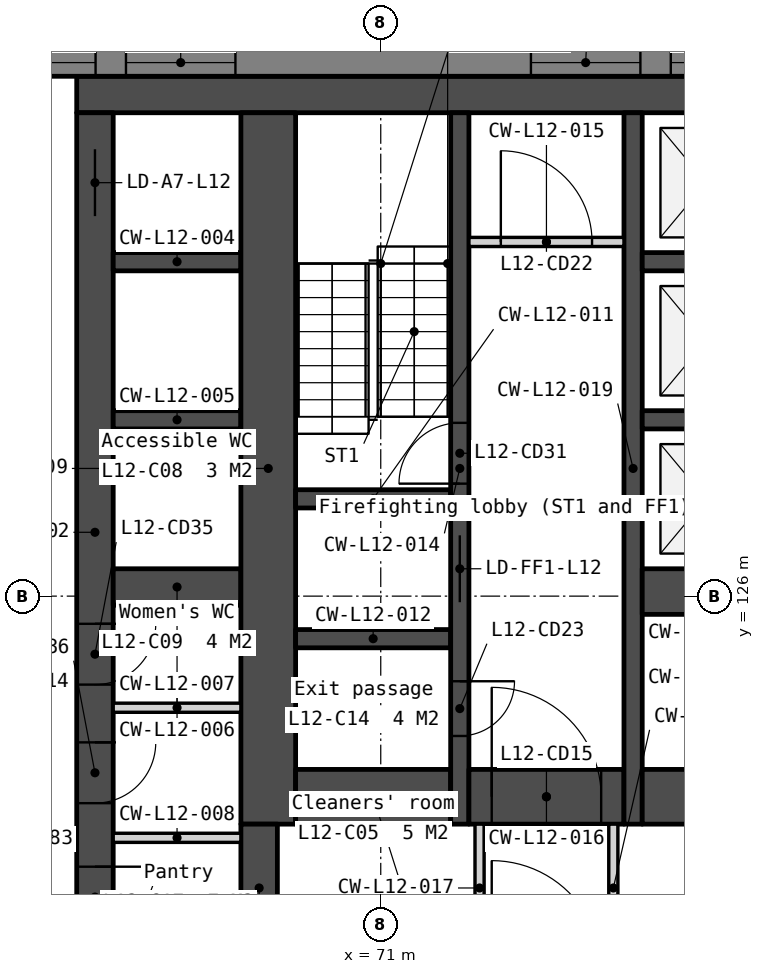
"""IFC4 building model, lengths in metres.
Left out: names, types, materials, properties, quantities, classifications, styles, units other than length and angle.
Written with IfcOpenShell. Run it as: python <this file> out.ifc"""

import sys

from ifc_helpers import new_model, si_unit, direction, frame, frame_2d, origin, place, context, subcontext, project, spatial, polyline, rectangle, outline, extrude, element, fill, save


model = new_model("IFC4")
c1 = context("Model", 3, precision=1e-05, world=origin(), true_north=direction((0.0, 1.0)))
c2 = subcontext(c1, "Body", "Model", "MODEL_VIEW")
j1 = project(units=[si_unit("LENGTHUNIT", "METRE"), si_unit("PLANEANGLEUNIT", "RADIAN")], contexts=[c1])
p1 = place(None, origin())
s1 = spatial("IfcSite", under=j1, at=p1, CompositionType="ELEMENT")
p2 = place(p1, origin())
s2 = spatial("IfcBuilding", under=s1, at=p2, CompositionType="ELEMENT")
p3 = place(p2, frame((0.0, 0.0, 56.0)))
s3 = spatial("IfcBuildingStorey", under=s2, at=p3, CompositionType="ELEMENT", Elevation=56.0)
p4 = place(p3, frame((66.0, 134.25, 0.0), z_axis=(0.0, 0.0, 1.0), x_axis=(1.0, 0.0, 0.0)))
e1 = element("IfcWall", 1, at=p4, inside=s3, PredefinedType="SOLIDWALL", context=c2, shape_type="SweptSolid", body=[
    extrude(rectangle(XDim=28.0, YDim=0.6, at=frame_2d((14.0, 0.0))), origin(), (0.0, 0.0, 1.0), 3.35),
])
p5 = place(p3, frame((66.3, 133.95, 0.0), z_axis=(0.0, 0.0, 1.0), x_axis=(0.0, -1.0, 0.0)))
e2 = element("IfcWall", 2, at=p5, inside=s3, PredefinedType="SOLIDWALL", context=c2, shape_type="SweptSolid", body=[
    extrude(rectangle(XDim=13.8, YDim=0.6, at=frame_2d((6.9, 0.0))), origin(), (0.0, 0.0, 1.0), 3.35),
])
p6 = place(p5, frame((0.6, 0.0, 0.0)))
e3 = element("IfcOpeningElement", 3, at=p6, cuts=e2, PredefinedType="OPENING", context=c2, shape_type="SweptSolid", body=[
    extrude(rectangle(XDim=1.1, YDim=2.1, at=frame_2d((0.55, 1.05))), frame((0.0, 0.31, 0.0), z_axis=(0.0, -1.0, 0.0), x_axis=(1.0, 0.0, 0.0)), (0.0, 0.0, 1.0), 0.62),
])
p7 = place(p5, frame((8.405, 0.0, 0.0)))
e4 = element("IfcOpeningElement", 4, at=p7, cuts=e2, PredefinedType="OPENING", context=c2, shape_type="SweptSolid", body=[
    extrude(rectangle(XDim=1.0, YDim=2.1, at=frame_2d((0.5, 1.05))), frame((0.0, 0.31, 0.0), z_axis=(0.0, -1.0, 0.0), x_axis=(1.0, 0.0, 0.0)), (0.0, 0.0, 1.0), 0.62),
])
p8 = place(p5, frame((10.355, 0.0, 0.0)))
e5 = element("IfcOpeningElement", 5, at=p8, cuts=e2, PredefinedType="OPENING", context=c2, shape_type="SweptSolid", body=[
    extrude(rectangle(XDim=1.0, YDim=2.1, at=frame_2d((0.5, 1.05))), frame((0.0, 0.31, 0.0), z_axis=(0.0, -1.0, 0.0), x_axis=(1.0, 0.0, 0.0)), (0.0, 0.0, 1.0), 0.62),
])
p9 = place(p5, frame((12.4, 0.0, 0.0)))
e6 = element("IfcOpeningElement", 6, at=p9, cuts=e2, PredefinedType="OPENING", context=c2, shape_type="SweptSolid", body=[
    extrude(rectangle(XDim=1.0, YDim=2.1, at=frame_2d((0.5, 1.05))), frame((0.0, 0.31, 0.0), z_axis=(0.0, -1.0, 0.0), x_axis=(1.0, 0.0, 0.0)), (0.0, 0.0, 1.0), 0.62),
])
for number, where, z_axis, x_axis in (
    (7, (66.6, 131.5, 0.0), (0.0, 0.0, 1.0), (1.0, 0.0, 0.0)),
    (8, (66.6, 128.9, 0.0), (0.0, 0.0, 1.0), (1.0, 0.0, 0.0)),
):
    element("IfcWall", number, at=place(p3, frame(where, z_axis=z_axis, x_axis=x_axis)), inside=s3, PredefinedType="SOLIDWALL", context=c2, shape_type="SweptSolid", body=[
        extrude(rectangle(XDim=2.1, YDim=0.3, at=frame_2d((1.05, 0.0))), origin(), (0.0, 0.0, 1.0), 3.35),
    ])
p10 = place(p3, frame((66.6, 126.15, 0.0), z_axis=(0.0, 0.0, 1.0), x_axis=(1.0, 0.0, 0.0)))
e9 = element("IfcWall", 9, at=p10, inside=s3, PredefinedType="SOLIDWALL", context=c2, shape_type="SweptSolid", body=[
    extrude(rectangle(XDim=2.1, YDim=0.6, at=frame_2d((1.05, 0.0))), origin(), (0.0, 0.0, 1.0), 3.35),
])
for number, where, z_axis, x_axis in (
    (10, (66.6, 124.165, 0.0), (0.0, 0.0, 1.0), (1.0, 0.0, 0.0)),
    (11, (66.6, 122.025, 0.0), (0.0, 0.0, 1.0), (1.0, 0.0, 0.0)),
):
    element("IfcWall", number, at=place(p3, frame(where, z_axis=z_axis, x_axis=x_axis)), inside=s3, PredefinedType="PARTITIONING", context=c2, shape_type="SweptSolid", body=[
        extrude(rectangle(XDim=2.1, YDim=0.15, at=frame_2d((1.05, 0.0))), origin(), (0.0, 0.0, 1.0), 3.35),
    ])
p11 = place(p3, frame((69.15, 133.95, 0.0), z_axis=(0.0, 0.0, 1.0), x_axis=(0.0, -1.0, 0.0)))
e12 = element("IfcWall", 12, at=p11, inside=s3, PredefinedType="SOLIDWALL", context=c2, shape_type="SweptSolid", body=[
    extrude(rectangle(XDim=11.7, YDim=0.9, at=frame_2d((5.85, 0.0))), origin(), (0.0, 0.0, 1.0), 3.35),
])
p12 = place(p3, frame((69.0, 122.25, 0.0), z_axis=(0.0, 0.0, 1.0), x_axis=(0.0, -1.0, 0.0)))
e13 = element("IfcWall", 13, at=p12, inside=s3, PredefinedType="SOLIDWALL", context=c2, shape_type="SweptSolid", body=[
    extrude(rectangle(XDim=2.1, YDim=0.6, at=frame_2d((1.05, 0.0))), origin(), (0.0, 0.0, 1.0), 3.35),
])
for number, where, z_axis, x_axis in (
    (14, (69.6, 127.6, 0.0), (0.0, 0.0, 1.0), (1.0, 0.0, 0.0)),
    (15, (69.6, 125.3, 0.0), (0.0, 0.0, 1.0), (1.0, 0.0, 0.0)),
):
    element("IfcWall", number, at=place(p3, frame(where, z_axis=z_axis, x_axis=x_axis)), inside=s3, PredefinedType="SOLIDWALL", context=c2, shape_type="SweptSolid", body=[
        extrude(rectangle(XDim=2.55, YDim=0.3, at=frame_2d((1.275, 0.0))), origin(), (0.0, 0.0, 1.0), 3.35),
    ])
p13 = place(p3, frame((69.6, 122.7, 0.0), z_axis=(0.0, 0.0, 1.0), x_axis=(1.0, 0.0, 0.0)))
e16 = element("IfcWall", 16, at=p13, inside=s3, PredefinedType="SOLIDWALL", context=c2, shape_type="SweptSolid", body=[
    extrude(rectangle(XDim=2.55, YDim=0.9, at=frame_2d((1.275, 0.0))), origin(), (0.0, 0.0, 1.0), 3.35),
])
p14 = place(p3, frame((72.3, 133.95, 0.0), z_axis=(0.0, 0.0, 1.0), x_axis=(0.0, -1.0, 0.0)))
e17 = element("IfcWall", 17, at=p14, inside=s3, PredefinedType="SOLIDWALL", context=c2, shape_type="SweptSolid", body=[
    extrude(rectangle(XDim=11.7, YDim=0.3, at=frame_2d((5.85, 0.0))), origin(), (0.0, 0.0, 1.0), 3.35),
])
p15 = place(p14, frame((6.95, 0.0, 0.0)))
e18 = element("IfcOpeningElement", 18, at=p15, cuts=e17, PredefinedType="OPENING", context=c2, shape_type="SweptSolid", body=[
    extrude(rectangle(XDim=1.1, YDim=2.1, at=frame_2d((0.55, 1.05))), frame((0.0, 0.16, 0.0), z_axis=(0.0, -1.0, 0.0), x_axis=(1.0, 0.0, 0.0)), (0.0, 0.0, 1.0), 0.32),
])
p16 = place(p14, frame((9.35, 0.0, 0.0)))
e19 = element("IfcOpeningElement", 19, at=p16, cuts=e17, PredefinedType="OPENING", context=c2, shape_type="SweptSolid", body=[
    extrude(rectangle(XDim=0.9, YDim=2.1, at=frame_2d((0.45, 1.05))), frame((0.0, 0.16, 0.0), z_axis=(0.0, -1.0, 0.0), x_axis=(1.0, 0.0, 0.0)), (0.0, 0.0, 1.0), 0.32),
])
p17 = place(p14, frame((5.1, 0.0, 0.0)))
e20 = element("IfcOpeningElement", 20, at=p17, cuts=e17, PredefinedType="OPENING", context=c2, shape_type="SweptSolid", body=[
    extrude(rectangle(XDim=1.0, YDim=2.1, at=frame_2d((0.5, 1.05))), frame((0.0, 0.16, 0.0), z_axis=(0.0, -1.0, 0.0), x_axis=(1.0, 0.0, 0.0)), (0.0, 0.0, 1.0), 0.32),
])
p18 = place(p3, frame((72.45, 131.825, 0.0), z_axis=(0.0, 0.0, 1.0), x_axis=(1.0, 0.0, 0.0)))
e21 = element("IfcWall", 21, at=p18, inside=s3, PredefinedType="PARTITIONING", context=c2, shape_type="SweptSolid", body=[
    extrude(rectangle(XDim=2.55, YDim=0.15, at=frame_2d((1.275, 0.0))), origin(), (0.0, 0.0, 1.0), 3.35),
])
p19 = place(p18, frame((0.525, 0.0, 0.0)))
e22 = element("IfcOpeningElement", 22, at=p19, cuts=e21, PredefinedType="OPENING", context=c2, shape_type="SweptSolid", body=[
    extrude(rectangle(XDim=1.5, YDim=2.1, at=frame_2d((0.75, 1.05))), frame((0.0, 0.085, 0.0), z_axis=(0.0, -1.0, 0.0), x_axis=(1.0, 0.0, 0.0)), (0.0, 0.0, 1.0), 0.17),
])
p20 = place(p3, frame((72.45, 122.7, 0.0), z_axis=(0.0, 0.0, 1.0), x_axis=(1.0, 0.0, 0.0)))
e23 = element("IfcWall", 23, at=p20, inside=s3, PredefinedType="SOLIDWALL", context=c2, shape_type="SweptSolid", body=[
    extrude(rectangle(XDim=2.55, YDim=0.9, at=frame_2d((1.275, 0.0))), origin(), (0.0, 0.0, 1.0), 3.35),
])
p21 = place(p20, frame((0.375, 0.0, 0.0)))
e24 = element("IfcOpeningElement", 24, at=p21, cuts=e23, PredefinedType="OPENING", context=c2, shape_type="SweptSolid", body=[
    extrude(rectangle(XDim=1.8, YDim=2.1, at=frame_2d((0.9, 1.05))), frame((0.0, 0.46, 0.0), z_axis=(0.0, -1.0, 0.0), x_axis=(1.0, 0.0, 0.0)), (0.0, 0.0, 1.0), 0.92),
])
for number, where, z_axis, x_axis in (
    (25, (72.625, 122.25, 0.0), (0.0, 0.0, 1.0), (0.0, -1.0, 0.0)),
    (26, (74.825, 122.25, 0.0), (0.0, 0.0, 1.0), (0.0, -1.0, 0.0)),
):
    element("IfcWall", number, at=place(p3, frame(where, z_axis=z_axis, x_axis=x_axis)), inside=s3, PredefinedType="PARTITIONING", context=c2, shape_type="SweptSolid", body=[
        extrude(rectangle(XDim=2.1, YDim=0.15, at=frame_2d((1.05, 0.0))), origin(), (0.0, 0.0, 1.0), 3.35),
    ])
p22 = place(p3, frame((75.15, 133.95, 0.0), z_axis=(0.0, 0.0, 1.0), x_axis=(0.0, -1.0, 0.0)))
e27 = element("IfcWall", 27, at=p22, inside=s3, PredefinedType="SOLIDWALL", context=c2, shape_type="SweptSolid", body=[
    extrude(rectangle(XDim=11.7, YDim=0.3, at=frame_2d((5.85, 0.0))), origin(), (0.0, 0.0, 1.0), 3.35),
])
for number, where, z_axis, x_axis in (
    (28, (75.3, 131.5, 0.0), (0.0, 0.0, 1.0), (1.0, 0.0, 0.0)),
    (29, (75.3, 128.9, 0.0), (0.0, 0.0, 1.0), (1.0, 0.0, 0.0)),
):
    element("IfcWall", number, at=place(p3, frame(where, z_axis=z_axis, x_axis=x_axis)), inside=s3, PredefinedType="SOLIDWALL", context=c2, shape_type="SweptSolid", body=[
        extrude(rectangle(XDim=2.1, YDim=0.3, at=frame_2d((1.05, 0.0))), origin(), (0.0, 0.0, 1.0), 3.35),
    ])
p23 = place(p3, frame((75.3, 126.075, 0.0), z_axis=(0.0, 0.0, 1.0), x_axis=(1.0, 0.0, 0.0)))
e30 = element("IfcWall", 30, at=p23, inside=s3, PredefinedType="SOLIDWALL", context=c2, shape_type="SweptSolid", body=[
    extrude(rectangle(XDim=2.1, YDim=0.75, at=frame_2d((1.05, 0.0))), origin(), (0.0, 0.0, 1.0), 3.35),
])
p24 = place(p3, frame((75.3, 122.7, 0.0), z_axis=(0.0, 0.0, 1.0), x_axis=(1.0, 0.0, 0.0)))
e31 = element("IfcWall", 31, at=p24, inside=s3, PredefinedType="SOLIDWALL", context=c2, shape_type="SweptSolid", body=[
    extrude(rectangle(XDim=6.2, YDim=0.9, at=frame_2d((3.1, 0.0))), origin(), (0.0, 0.0, 1.0), 3.35),
])
p25 = place(p3, frame((102.4, 134.775, -0.15), z_axis=(0.0, 0.0, 1.0), x_axis=(-1.0, 0.0, 0.0)))
e32 = element("IfcWall", 32, at=p25, inside=s3, PredefinedType="SOLIDWALL", context=c2, shape_type="SweptSolid", body=[
    extrude(outline(polyline([(44.8, 0.0), (44.8, 3.5), (0.0, 3.5), (0.0, 0.0), (44.8, 0.0)])), frame((0.0, 0.225, 0.0), z_axis=(0.0, -1.0, 0.0), x_axis=(1.0, 0.0, 0.0)), (0.0, 0.0, 1.0), 0.45),
])
p26 = place(p25, frame((0.786, 0.0, 1.05)))
e33 = element("IfcOpeningElement", 33, at=p26, cuts=e32, PredefinedType="OPENING", context=c2, shape_type="SweptSolid", body=[
    extrude(rectangle(XDim=1.2, YDim=1.5, at=frame_2d((0.6, 0.75))), frame((0.0, 0.235, 0.0), z_axis=(0.0, -1.0, 0.0), x_axis=(1.0, 0.0, 0.0)), (0.0, 0.0, 1.0), 0.47),
])
p27 = place(p25, frame((6.91, 0.0, 1.05)))
e34 = element("IfcOpeningElement", 34, at=p27, cuts=e32, PredefinedType="OPENING", context=c2, shape_type="SweptSolid", body=[
    extrude(rectangle(XDim=1.8, YDim=1.5, at=frame_2d((0.9, 0.75))), frame((0.0, 0.235, 0.0), z_axis=(0.0, -1.0, 0.0), x_axis=(1.0, 0.0, 0.0)), (0.0, 0.0, 1.0), 0.47),
])
p28 = place(p25, frame((9.21, 0.0, 1.05)))
e35 = element("IfcOpeningElement", 35, at=p28, cuts=e32, PredefinedType="OPENING", context=c2, shape_type="SweptSolid", body=[
    extrude(rectangle(XDim=1.8, YDim=1.5, at=frame_2d((0.9, 0.75))), frame((0.0, 0.235, 0.0), z_axis=(0.0, -1.0, 0.0), x_axis=(1.0, 0.0, 0.0)), (0.0, 0.0, 1.0), 0.47),
])
p29 = place(p25, frame((15.87, 0.0, 1.05)))
e36 = element("IfcOpeningElement", 36, at=p29, cuts=e32, PredefinedType="OPENING", context=c2, shape_type="SweptSolid", body=[
    extrude(rectangle(XDim=1.8, YDim=1.5, at=frame_2d((0.9, 0.75))), frame((0.0, 0.235, 0.0), z_axis=(0.0, -1.0, 0.0), x_axis=(1.0, 0.0, 0.0)), (0.0, 0.0, 1.0), 0.47),
])
p30 = place(p25, frame((18.17, 0.0, 1.05)))
e37 = element("IfcOpeningElement", 37, at=p30, cuts=e32, PredefinedType="OPENING", context=c2, shape_type="SweptSolid", body=[
    extrude(rectangle(XDim=1.8, YDim=1.5, at=frame_2d((0.9, 0.75))), frame((0.0, 0.235, 0.0), z_axis=(0.0, -1.0, 0.0), x_axis=(1.0, 0.0, 0.0)), (0.0, 0.0, 1.0), 0.47),
])
p31 = place(p25, frame((24.83, 0.0, 1.05)))
e38 = element("IfcOpeningElement", 38, at=p31, cuts=e32, PredefinedType="OPENING", context=c2, shape_type="SweptSolid", body=[
    extrude(rectangle(XDim=1.8, YDim=1.5, at=frame_2d((0.9, 0.75))), frame((0.0, 0.235, 0.0), z_axis=(0.0, -1.0, 0.0), x_axis=(1.0, 0.0, 0.0)), (0.0, 0.0, 1.0), 0.47),
])
p32 = place(p25, frame((27.13, 0.0, 1.05)))
e39 = element("IfcOpeningElement", 39, at=p32, cuts=e32, PredefinedType="OPENING", context=c2, shape_type="SweptSolid", body=[
    extrude(rectangle(XDim=1.8, YDim=1.5, at=frame_2d((0.9, 0.75))), frame((0.0, 0.235, 0.0), z_axis=(0.0, -1.0, 0.0), x_axis=(1.0, 0.0, 0.0)), (0.0, 0.0, 1.0), 0.47),
])
p33 = place(p25, frame((33.79, 0.0, 1.05)))
e40 = element("IfcOpeningElement", 40, at=p33, cuts=e32, PredefinedType="OPENING", context=c2, shape_type="SweptSolid", body=[
    extrude(rectangle(XDim=1.8, YDim=1.5, at=frame_2d((0.9, 0.75))), frame((0.0, 0.235, 0.0), z_axis=(0.0, -1.0, 0.0), x_axis=(1.0, 0.0, 0.0)), (0.0, 0.0, 1.0), 0.47),
])
p34 = place(p25, frame((36.09, 0.0, 1.05)))
e41 = element("IfcOpeningElement", 41, at=p34, cuts=e32, PredefinedType="OPENING", context=c2, shape_type="SweptSolid", body=[
    extrude(rectangle(XDim=1.8, YDim=1.5, at=frame_2d((0.9, 0.75))), frame((0.0, 0.235, 0.0), z_axis=(0.0, -1.0, 0.0), x_axis=(1.0, 0.0, 0.0)), (0.0, 0.0, 1.0), 0.47),
])
p35 = place(p25, frame((42.814, 0.0, 1.05)))
e42 = element("IfcOpeningElement", 42, at=p35, cuts=e32, PredefinedType="OPENING", context=c2, shape_type="SweptSolid", body=[
    extrude(rectangle(XDim=1.2, YDim=1.5, at=frame_2d((0.6, 0.75))), frame((0.0, 0.235, 0.0), z_axis=(0.0, -1.0, 0.0), x_axis=(1.0, 0.0, 0.0)), (0.0, 0.0, 1.0), 0.47),
])
p36 = place(p6, origin())
e43 = element("IfcDoor", 43, at=p36, inside=s3, OperationType="SLIDING_TO_LEFT", PredefinedType="DOOR", context=c2, shape_type="SweptSolid", body=[
    extrude(rectangle(XDim=1.1, YDim=2.1, at=frame_2d((0.55, 1.05))), frame((0.0, 0.025, 0.0), z_axis=(0.0, -1.0, 0.0), x_axis=(1.0, 0.0, 0.0)), (0.0, 0.0, 1.0), 0.05),
])
fill(e3, e43)
p37 = place(p15, origin())
e44 = element("IfcDoor", 44, at=p37, inside=s3, OperationType="SLIDING_TO_LEFT", PredefinedType="DOOR", context=c2, shape_type="SweptSolid", body=[
    extrude(rectangle(XDim=1.1, YDim=2.1, at=frame_2d((0.55, 1.05))), frame((0.0, 0.025, 0.0), z_axis=(0.0, -1.0, 0.0), x_axis=(1.0, 0.0, 0.0)), (0.0, 0.0, 1.0), 0.05),
])
fill(e18, e44)
p38 = place(p21, origin())
e45 = element("IfcDoor", 45, at=p38, inside=s3, OperationType="DOUBLE_DOOR_DOUBLE_SWING", PredefinedType="DOOR", context=c2, shape_type="SweptSolid", body=[
    extrude(rectangle(XDim=1.8, YDim=2.1, at=frame_2d((0.9, 1.05))), frame((0.0, 0.025, 0.0), z_axis=(0.0, -1.0, 0.0), x_axis=(1.0, 0.0, 0.0)), (0.0, 0.0, 1.0), 0.05),
])
fill(e24, e45)
p39 = place(p19, origin())
e46 = element("IfcDoor", 46, at=p39, inside=s3, OperationType="DOUBLE_DOOR_DOUBLE_SWING", PredefinedType="DOOR", context=c2, shape_type="SweptSolid", body=[
    extrude(rectangle(XDim=1.5, YDim=2.1, at=frame_2d((0.75, 1.05))), frame((0.0, 0.025, 0.0), z_axis=(0.0, -1.0, 0.0), x_axis=(1.0, 0.0, 0.0)), (0.0, 0.0, 1.0), 0.05),
])
fill(e22, e46)
p40 = place(p16, origin())
e47 = element("IfcDoor", 47, at=p40, inside=s3, OperationType="SINGLE_SWING_LEFT", PredefinedType="DOOR", context=c2, shape_type="SweptSolid", body=[
    extrude(rectangle(XDim=0.9, YDim=2.1, at=frame_2d((0.45, 1.05))), frame((0.0, 0.025, 0.0), z_axis=(0.0, -1.0, 0.0), x_axis=(1.0, 0.0, 0.0)), (0.0, 0.0, 1.0), 0.05),
])
fill(e19, e47)
p41 = place(p17, origin())
e48 = element("IfcDoor", 48, at=p41, inside=s3, OperationType="SINGLE_SWING_RIGHT", PredefinedType="DOOR", context=c2, shape_type="SweptSolid", body=[
    extrude(rectangle(XDim=1.0, YDim=2.1, at=frame_2d((0.5, 1.05))), frame((0.0, 0.025, 0.0), z_axis=(0.0, -1.0, 0.0), x_axis=(1.0, 0.0, 0.0)), (0.0, 0.0, 1.0), 0.05),
])
fill(e20, e48)
p42 = place(p7, origin())
e49 = element("IfcDoor", 49, at=p42, inside=s3, OperationType="SINGLE_SWING_LEFT", PredefinedType="DOOR", context=c2, shape_type="SweptSolid", body=[
    extrude(rectangle(XDim=1.0, YDim=2.1, at=frame_2d((0.5, 1.05))), frame((0.0, 0.025, 0.0), z_axis=(0.0, -1.0, 0.0), x_axis=(1.0, 0.0, 0.0)), (0.0, 0.0, 1.0), 0.05),
])
fill(e4, e49)
p43 = place(p8, origin())
e50 = element("IfcDoor", 50, at=p43, inside=s3, OperationType="SINGLE_SWING_LEFT", PredefinedType="DOOR", context=c2, shape_type="SweptSolid", body=[
    extrude(rectangle(XDim=1.0, YDim=2.1, at=frame_2d((0.5, 1.05))), frame((0.0, 0.025, 0.0), z_axis=(0.0, -1.0, 0.0), x_axis=(1.0, 0.0, 0.0)), (0.0, 0.0, 1.0), 0.05),
])
fill(e5, e50)
p44 = place(p9, origin())
e51 = element("IfcDoor", 51, at=p44, inside=s3, OperationType="SINGLE_SWING_LEFT", PredefinedType="DOOR", context=c2, shape_type="SweptSolid", body=[
    extrude(rectangle(XDim=1.0, YDim=2.1, at=frame_2d((0.5, 1.05))), frame((0.0, 0.025, 0.0), z_axis=(0.0, -1.0, 0.0), x_axis=(1.0, 0.0, 0.0)), (0.0, 0.0, 1.0), 0.05),
])
fill(e6, e51)
p45 = place(p31, origin())
e52 = element("IfcWindow", 52, at=p45, inside=s3, PartitioningType="SINGLE_PANEL", PredefinedType="WINDOW", context=c2, shape_type="SweptSolid", body=[
    extrude(rectangle(XDim=1.8, YDim=1.5, at=frame_2d((0.9, 0.75))), frame((0.0, 0.03, 0.0), z_axis=(0.0, -1.0, 0.0), x_axis=(1.0, 0.0, 0.0)), (0.0, 0.0, 1.0), 0.06),
])
fill(e38, e52)
p46 = place(p32, origin())
e53 = element("IfcWindow", 53, at=p46, inside=s3, PartitioningType="SINGLE_PANEL", PredefinedType="WINDOW", context=c2, shape_type="SweptSolid", body=[
    extrude(rectangle(XDim=1.8, YDim=1.5, at=frame_2d((0.9, 0.75))), frame((0.0, 0.03, 0.0), z_axis=(0.0, -1.0, 0.0), x_axis=(1.0, 0.0, 0.0)), (0.0, 0.0, 1.0), 0.06),
])
fill(e39, e53)
p47 = place(p33, origin())
e54 = element("IfcWindow", 54, at=p47, inside=s3, PartitioningType="SINGLE_PANEL", PredefinedType="WINDOW", context=c2, shape_type="SweptSolid", body=[
    extrude(rectangle(XDim=1.8, YDim=1.5, at=frame_2d((0.9, 0.75))), frame((0.0, 0.03, 0.0), z_axis=(0.0, -1.0, 0.0), x_axis=(1.0, 0.0, 0.0)), (0.0, 0.0, 1.0), 0.06),
])
fill(e40, e54)
p48 = place(p34, origin())
e55 = element("IfcWindow", 55, at=p48, inside=s3, PartitioningType="SINGLE_PANEL", PredefinedType="WINDOW", context=c2, shape_type="SweptSolid", body=[
    extrude(rectangle(XDim=1.8, YDim=1.5, at=frame_2d((0.9, 0.75))), frame((0.0, 0.03, 0.0), z_axis=(0.0, -1.0, 0.0), x_axis=(1.0, 0.0, 0.0)), (0.0, 0.0, 1.0), 0.06),
])
fill(e41, e55)
save(model, sys.argv[1])
